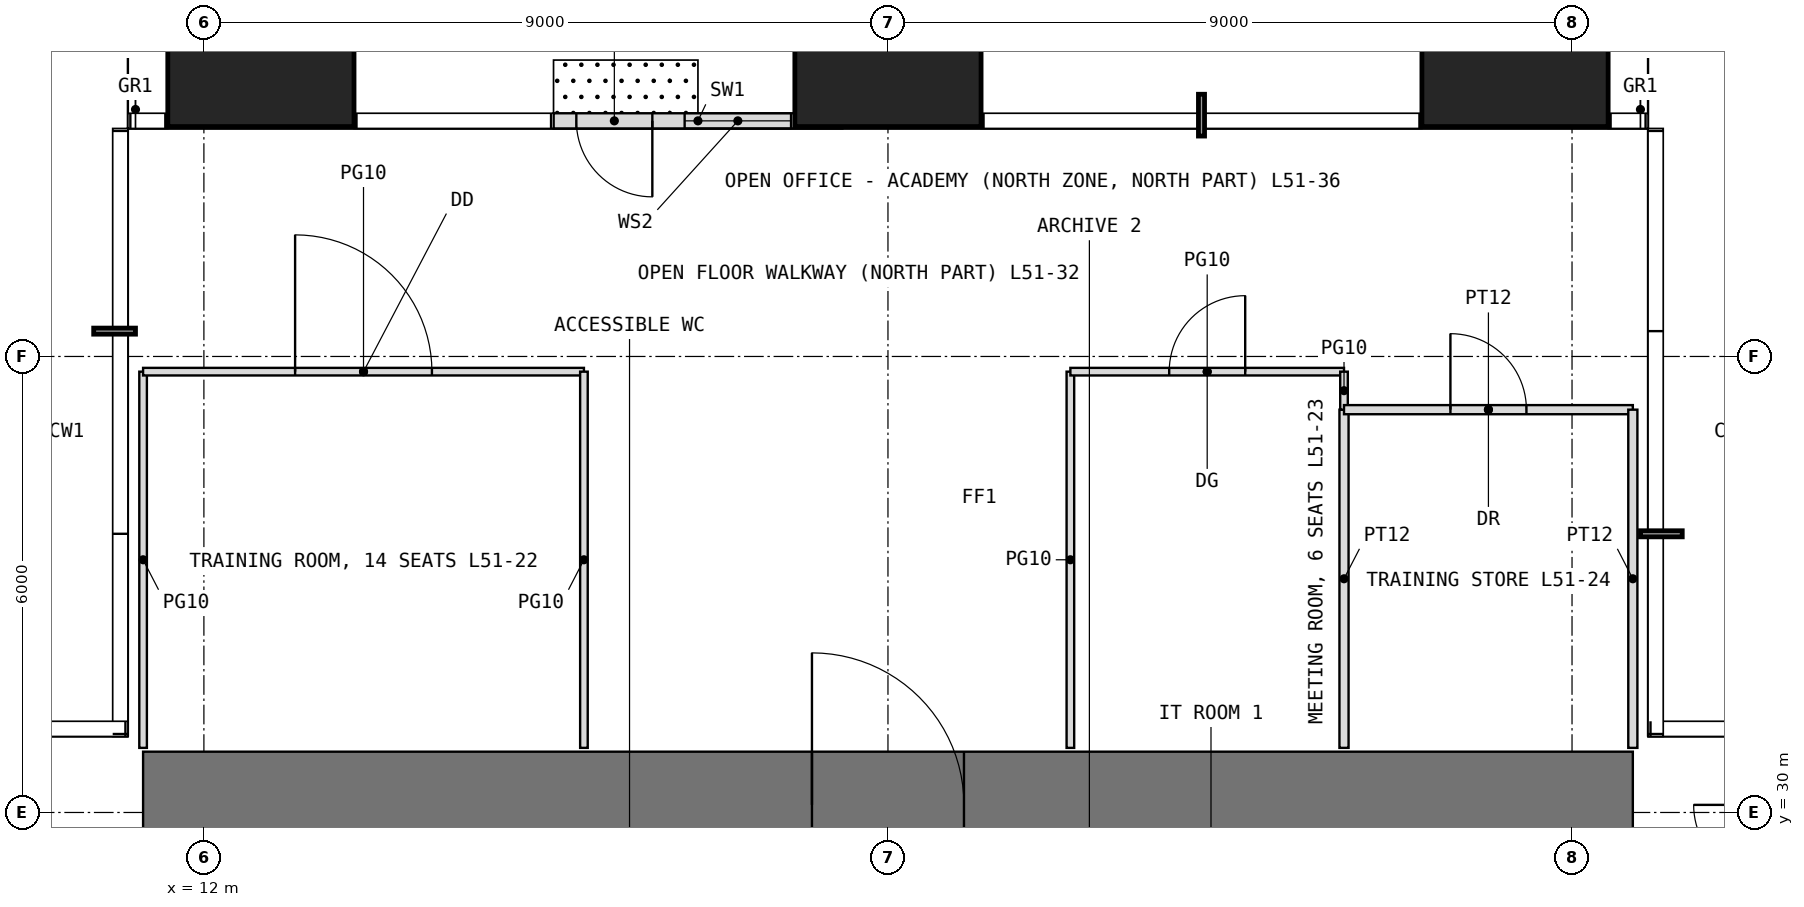
"""IFC4 building model, lengths in metres.
Left out: names, types, materials, properties, quantities, classifications, styles, units other than length and angle.
Written with IfcOpenShell. Run it as: python <this file> out.ifc"""

import sys

from ifc_helpers import new_model, si_unit, direction, frame, frame_2d, origin, origin_2d, place, context, subcontext, project, spatial, rectangle, extrude, element, fill, save


model = new_model("IFC4")
c1 = context("Model", 3, precision=1e-05, world=origin(), true_north=direction((0.0, 1.0)))
c2 = subcontext(c1, "Body", "Model", "MODEL_VIEW")
j1 = project(units=[si_unit("LENGTHUNIT", "METRE"), si_unit("PLANEANGLEUNIT", "RADIAN")], contexts=[c1])
p1 = place(None, origin())
s1 = spatial("IfcSite", under=j1, at=p1, CompositionType="ELEMENT")
p2 = place(p1, origin())
s2 = spatial("IfcBuilding", under=s1, at=p2, CompositionType="ELEMENT")
p3 = place(p2, frame((0.0, 0.0, 214.5)))
s3 = spatial("IfcBuildingStorey", under=s2, at=p3, CompositionType="ELEMENT", Elevation=214.5)
for number, where, z_axis, x_axis in (
    (1, (12.75, 40.25, 0.0), (0.0, 0.0, 1.0), (1.0, 0.0, 0.0)),
    (2, (21.0, 40.25, 0.0), (0.0, 0.0, 1.0), (1.0, 0.0, 0.0)),
    (3, (29.25, 40.25, 0.0), (0.0, 0.0, 1.0), (1.0, 0.0, 0.0)),
):
    element("IfcColumn", number, at=place(p3, frame(where, z_axis=z_axis, x_axis=x_axis)), inside=s3, PredefinedType="COLUMN", context=c2, shape_type="SweptSolid", body=[
        extrude(rectangle(XDim=2.45, YDim=2.45, at=origin_2d()), origin(), (0.0, 0.0, 1.0), 4.0),
    ])
p4 = place(p3, frame((20.4, 39.1, 0.0), z_axis=(0.0, 0.0, 1.0), x_axis=(-1.0, 0.0, 0.0)))
e4 = element("IfcWall", 4, at=p4, inside=s3, PredefinedType="USERDEFINED", context=c2, shape_type="SweptSolid", body=[
    extrude(rectangle(XDim=3.8, YDim=0.2, at=frame_2d((1.9, 0.0))), origin(), (0.0, 0.0, 1.0), 3.75),
])
p5 = place(p4, frame((2.5, 0.0, 0.0)))
e5 = element("IfcOpeningElement", 5, at=p5, cuts=e4, PredefinedType="OPENING", context=c2, shape_type="SweptSolid", body=[
    extrude(rectangle(XDim=1.0, YDim=2.4, at=frame_2d((0.5, 1.2))), frame((0.0, 0.11, 0.0), z_axis=(0.0, -1.0, 0.0), x_axis=(1.0, 0.0, 0.0)), (0.0, 0.0, 1.0), 0.22),
])
p6 = place(p4, frame((0.675, 0.0, 0.3)))
e6 = element("IfcOpeningElement", 6, at=p6, cuts=e4, PredefinedType="OPENING", context=c2, shape_type="SweptSolid", body=[
    extrude(rectangle(XDim=1.4, YDim=2.7, at=frame_2d((0.7, 1.35))), frame((0.0, 0.11, 0.0), z_axis=(0.0, -1.0, 0.0), x_axis=(1.0, 0.0, 0.0)), (0.0, 0.0, 1.0), 0.22),
])
p7 = place(p3, frame((11.2, 30.1, -0.05), z_axis=(0.0, 0.0, 1.0), x_axis=(1.0, 0.0, 0.0)))
e7 = element("IfcWall", 7, at=p7, inside=s3, PredefinedType="SHEAR", context=c2, shape_type="SweptSolid", body=[
    extrude(rectangle(XDim=19.6, YDim=1.4, at=frame_2d((9.8, 0.0))), origin(), (0.0, 0.0, 1.0), 4.0),
])
p8 = place(p7, frame((8.8, 0.0, 0.05)))
e8 = element("IfcOpeningElement", 8, at=p8, cuts=e7, PredefinedType="OPENING", context=c2, shape_type="SweptSolid", body=[
    extrude(rectangle(XDim=2.0, YDim=2.2, at=frame_2d((1.0, 1.1))), frame((0.0, 0.71, 0.0), z_axis=(0.0, -1.0, 0.0), x_axis=(1.0, 0.0, 0.0)), (0.0, 0.0, 1.0), 1.42),
])
p9 = place(p3, frame((11.2, 30.85, 0.0), z_axis=(0.0, 0.0, 1.0), x_axis=(0.0, 1.0, 0.0)))
e9 = element("IfcWall", 9, at=p9, inside=s3, PredefinedType="PARTITIONING", context=c2, shape_type="SweptSolid", body=[
    extrude(rectangle(XDim=4.95, YDim=0.1, at=frame_2d((2.475, 0.0))), origin(), (0.0, 0.0, 1.0), 3.75),
])
p10 = place(p3, frame((11.2, 35.8, 0.0), z_axis=(0.0, 0.0, 1.0), x_axis=(1.0, 0.0, 0.0)))
e10 = element("IfcWall", 10, at=p10, inside=s3, PredefinedType="PARTITIONING", context=c2, shape_type="SweptSolid", body=[
    extrude(rectangle(XDim=5.8, YDim=0.1, at=frame_2d((2.9, 0.0))), origin(), (0.0, 0.0, 1.0), 3.75),
])
p11 = place(p10, frame((2.0, 0.0, 0.0)))
e11 = element("IfcOpeningElement", 11, at=p11, cuts=e10, PredefinedType="OPENING", context=c2, shape_type="SweptSolid", body=[
    extrude(rectangle(XDim=1.8, YDim=2.4, at=frame_2d((0.9, 1.2))), frame((0.0, 0.06, 0.0), z_axis=(0.0, -1.0, 0.0), x_axis=(1.0, 0.0, 0.0)), (0.0, 0.0, 1.0), 0.12),
])
for number, where, z_axis, x_axis in (
    (12, (17.0, 30.85, 0.0), (0.0, 0.0, 1.0), (0.0, 1.0, 0.0)),
    (13, (23.4, 30.85, 0.0), (0.0, 0.0, 1.0), (0.0, 1.0, 0.0)),
):
    element("IfcWall", number, at=place(p3, frame(where, z_axis=z_axis, x_axis=x_axis)), inside=s3, PredefinedType="PARTITIONING", context=c2, shape_type="SweptSolid", body=[
        extrude(rectangle(XDim=4.95, YDim=0.1, at=frame_2d((2.475, 0.0))), origin(), (0.0, 0.0, 1.0), 3.75),
    ])
p12 = place(p3, frame((23.4, 35.8, 0.0), z_axis=(0.0, 0.0, 1.0), x_axis=(1.0, 0.0, 0.0)))
e14 = element("IfcWall", 14, at=p12, inside=s3, PredefinedType="PARTITIONING", context=c2, shape_type="SweptSolid", body=[
    extrude(rectangle(XDim=3.6, YDim=0.1, at=frame_2d((1.8, 0.0))), origin(), (0.0, 0.0, 1.0), 3.75),
])
p13 = place(p12, frame((1.3, 0.0, 0.0)))
e15 = element("IfcOpeningElement", 15, at=p13, cuts=e14, PredefinedType="OPENING", context=c2, shape_type="SweptSolid", body=[
    extrude(rectangle(XDim=1.0, YDim=2.4, at=frame_2d((0.5, 1.2))), frame((0.0, 0.06, 0.0), z_axis=(0.0, -1.0, 0.0), x_axis=(1.0, 0.0, 0.0)), (0.0, 0.0, 1.0), 0.12),
])
p14 = place(p3, frame((27.0, 30.85, 0.0), z_axis=(0.0, 0.0, 1.0), x_axis=(0.0, 1.0, 0.0)))
e16 = element("IfcWall", 16, at=p14, inside=s3, PredefinedType="PARTITIONING", context=c2, shape_type="SweptSolid", body=[
    extrude(rectangle(XDim=4.45, YDim=0.12, at=frame_2d((2.225, 0.0))), origin(), (0.0, 0.0, 1.0), 3.75),
])
p15 = place(p3, frame((27.0, 35.3, 0.0), z_axis=(0.0, 0.0, 1.0), x_axis=(0.0, 1.0, 0.0)))
e17 = element("IfcWall", 17, at=p15, inside=s3, PredefinedType="PARTITIONING", context=c2, shape_type="SweptSolid", body=[
    extrude(rectangle(XDim=0.5, YDim=0.1, at=frame_2d((0.25, 0.0))), origin(), (0.0, 0.0, 1.0), 3.75),
])
p16 = place(p3, frame((27.0, 35.3, 0.0), z_axis=(0.0, 0.0, 1.0), x_axis=(1.0, 0.0, 0.0)))
e18 = element("IfcWall", 18, at=p16, inside=s3, PredefinedType="PARTITIONING", context=c2, shape_type="SweptSolid", body=[
    extrude(rectangle(XDim=3.8, YDim=0.12, at=frame_2d((1.9, 0.0))), origin(), (0.0, 0.0, 1.0), 3.75),
])
p17 = place(p16, frame((1.4, 0.0, 0.0)))
e19 = element("IfcOpeningElement", 19, at=p17, cuts=e18, PredefinedType="OPENING", context=c2, shape_type="SweptSolid", body=[
    extrude(rectangle(XDim=1.0, YDim=2.2, at=frame_2d((0.5, 1.1))), frame((0.0, 0.07, 0.0), z_axis=(0.0, -1.0, 0.0), x_axis=(1.0, 0.0, 0.0)), (0.0, 0.0, 1.0), 0.14),
])
p18 = place(p3, frame((30.8, 30.85, 0.0), z_axis=(0.0, 0.0, 1.0), x_axis=(0.0, 1.0, 0.0)))
e20 = element("IfcWall", 20, at=p18, inside=s3, PredefinedType="PARTITIONING", context=c2, shape_type="SweptSolid", body=[
    extrude(rectangle(XDim=4.45, YDim=0.12, at=frame_2d((2.225, 0.0))), origin(), (0.0, 0.0, 1.0), 3.75),
])
p19 = place(p5, origin())
e21 = element("IfcDoor", 21, at=p19, inside=s3, OperationType="SINGLE_SWING_LEFT", PredefinedType="DOOR", context=c2, shape_type="SweptSolid", body=[
    extrude(rectangle(XDim=1.0, YDim=2.4, at=frame_2d((0.5, 1.2))), frame((0.0, 0.025, 0.0), z_axis=(0.0, -1.0, 0.0), x_axis=(1.0, 0.0, 0.0)), (0.0, 0.0, 1.0), 0.05),
])
fill(e5, e21)
p20 = place(p6, origin())
e22 = element("IfcWindow", 22, at=p20, inside=s3, PartitioningType="SINGLE_PANEL", PredefinedType="WINDOW", context=c2, shape_type="SweptSolid", body=[
    extrude(rectangle(XDim=1.4, YDim=2.7, at=frame_2d((0.7, 1.35))), frame((0.0, 0.03, 0.0), z_axis=(0.0, -1.0, 0.0), x_axis=(1.0, 0.0, 0.0)), (0.0, 0.0, 1.0), 0.06),
])
fill(e6, e22)
p21 = place(p8, origin())
e23 = element("IfcDoor", 23, at=p21, inside=s3, OperationType="DOUBLE_DOOR_SINGLE_SWING", PredefinedType="DOOR", context=c2, shape_type="SweptSolid", body=[
    extrude(rectangle(XDim=2.0, YDim=2.2, at=frame_2d((1.0, 1.1))), frame((0.0, 0.025, 0.0), z_axis=(0.0, -1.0, 0.0), x_axis=(1.0, 0.0, 0.0)), (0.0, 0.0, 1.0), 0.05),
])
fill(e8, e23)
p22 = place(p11, origin())
e24 = element("IfcDoor", 24, at=p22, inside=s3, OperationType="DOUBLE_DOOR_SINGLE_SWING", PredefinedType="DOOR", context=c2, shape_type="SweptSolid", body=[
    extrude(rectangle(XDim=1.8, YDim=2.4, at=frame_2d((0.9, 1.2))), frame((0.0, 0.025, 0.0), z_axis=(0.0, -1.0, 0.0), x_axis=(1.0, 0.0, 0.0)), (0.0, 0.0, 1.0), 0.05),
])
fill(e11, e24)
p23 = place(p13, origin())
e25 = element("IfcDoor", 25, at=p23, inside=s3, OperationType="SINGLE_SWING_RIGHT", PredefinedType="DOOR", context=c2, shape_type="SweptSolid", body=[
    extrude(rectangle(XDim=1.0, YDim=2.4, at=frame_2d((0.5, 1.2))), frame((0.0, 0.025, 0.0), z_axis=(0.0, -1.0, 0.0), x_axis=(1.0, 0.0, 0.0)), (0.0, 0.0, 1.0), 0.05),
])
fill(e15, e25)
p24 = place(p17, origin())
e26 = element("IfcDoor", 26, at=p24, inside=s3, OperationType="SINGLE_SWING_LEFT", PredefinedType="DOOR", context=c2, shape_type="SweptSolid", body=[
    extrude(rectangle(XDim=1.0, YDim=2.2, at=frame_2d((0.5, 1.1))), frame((0.0, 0.025, 0.0), z_axis=(0.0, -1.0, 0.0), x_axis=(1.0, 0.0, 0.0)), (0.0, 0.0, 1.0), 0.05),
])
fill(e19, e26)
save(model, sys.argv[1])
